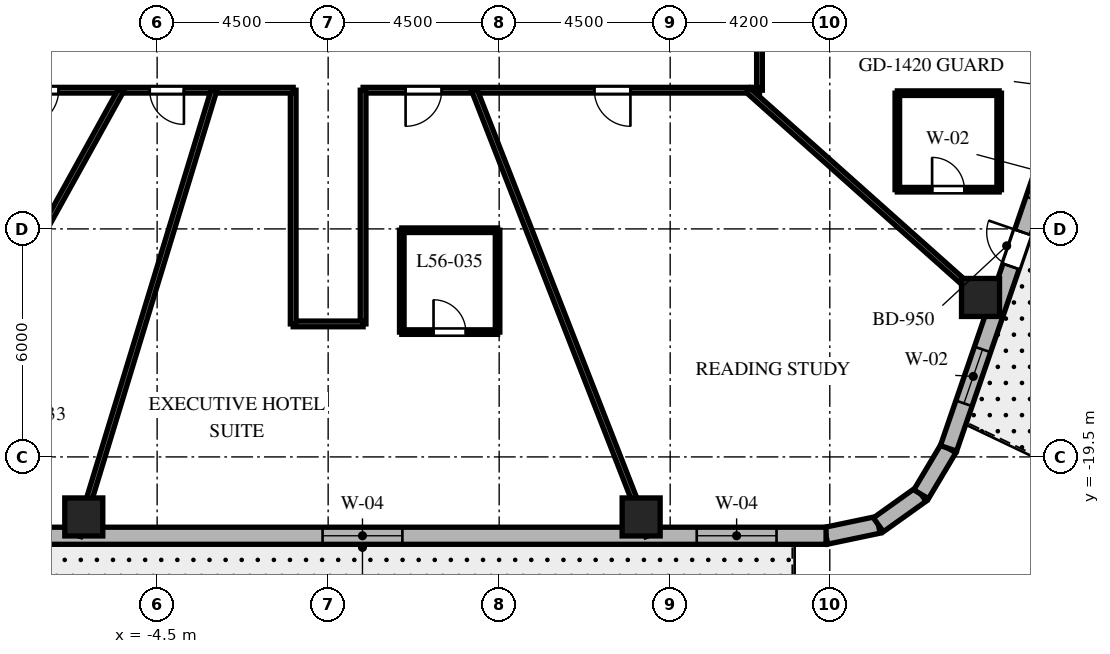
"""IFC4 building model, lengths in metres.
Left out: names, types, materials, properties, quantities, classifications, styles, units other than length and angle.
Written with IfcOpenShell. Run it as: python <this file> out.ifc"""

import sys

from ifc_helpers import new_model, si_unit, direction, frame, frame_2d, origin, origin_2d, place, context, subcontext, project, spatial, rectangle, extrude, element, fill, save


model = new_model("IFC4")
c1 = context("Model", 3, precision=1e-05, world=origin(), true_north=direction((0.0, 1.0)))
c2 = subcontext(c1, "Body", "Model", "MODEL_VIEW")
j1 = project(units=[si_unit("LENGTHUNIT", "METRE"), si_unit("PLANEANGLEUNIT", "RADIAN")], contexts=[c1])
p1 = place(None, origin())
s1 = spatial("IfcSite", under=j1, at=p1, CompositionType="ELEMENT")
p2 = place(p1, origin())
s2 = spatial("IfcBuilding", under=s1, at=p2, CompositionType="ELEMENT")
p3 = place(p2, frame((0.0, 0.0, 225.5)))
s3 = spatial("IfcBuildingStorey", under=s2, at=p3, CompositionType="ELEMENT", Elevation=225.5)
for number, where, z_axis, x_axis in (
    (1, (-6.43, -21.08, 0.0), (0.0, 0.0, 1.0), (1.0, 0.0, 0.0)),
    (2, (8.236, -21.08, 0.0), (0.0, 0.0, 1.0), (1.0, 0.0, 0.0)),
    (3, (17.166, -15.304, 0.0), (0.0, 0.0, 1.0), (1.0, 0.0, 0.0)),
):
    element("IfcColumn", number, at=place(p3, frame(where, z_axis=z_axis, x_axis=x_axis)), inside=s3, PredefinedType="COLUMN", context=c2, shape_type="SweptSolid", body=[
        extrude(rectangle(XDim=1.0, YDim=1.0, at=origin_2d()), origin(), (0.0, 0.0, 1.0), 3.8),
    ])
p4 = place(p3, frame((13.102, -21.575, 0.0), z_axis=(0.0, 0.0, 1.0), x_axis=(0.978757421505, 0.205021730188, 0.0)))
e4 = element("IfcWall", 4, at=p4, inside=s3, PredefinedType="SOLIDWALL", context=c2, shape_type="SweptSolid", body=[
    extrude(rectangle(XDim=1.406, YDim=0.45, at=frame_2d((0.703, 0.0))), origin(), (0.0, 0.0, 1.0), 3.5),
])
p5 = place(p3, frame((14.478, -21.287, 0.0), z_axis=(0.0, 0.0, 1.0), x_axis=(0.813888518617, 0.58102106611, 0.0)))
e5 = element("IfcWall", 5, at=p5, inside=s3, PredefinedType="SOLIDWALL", context=c2, shape_type="SweptSolid", body=[
    extrude(rectangle(XDim=1.383, YDim=0.45, at=frame_2d((0.691, 0.0))), origin(), (0.0, 0.0, 1.0), 3.5),
])
p6 = place(p3, frame((15.604, -20.483, 0.0), z_axis=(0.0, 0.0, 1.0), x_axis=(0.512222149036, 0.858852996756, 0.0)))
e6 = element("IfcWall", 6, at=p6, inside=s3, PredefinedType="SOLIDWALL", context=c2, shape_type="SweptSolid", body=[
    extrude(rectangle(XDim=1.406, YDim=0.45, at=frame_2d((0.703, 0.0))), origin(), (0.0, 0.0, 1.0), 3.5),
])
p7 = place(p3, frame((-11.298, -21.575, 0.0), z_axis=(0.0, 0.0, 1.0), x_axis=(1.0, 0.0, 0.0)))
e7 = element("IfcWall", 7, at=p7, inside=s3, PredefinedType="SOLIDWALL", context=c2, shape_type="SweptSolid", body=[
    extrude(rectangle(XDim=24.399, YDim=0.45, at=frame_2d((12.2, 0.0))), origin(), (0.0, 0.0, 1.0), 3.5),
])
p8 = place(p7, frame((2.55, 0.0, 0.0)))
e8 = element("IfcOpeningElement", 8, at=p8, cuts=e7, PredefinedType="OPENING", context=c2, shape_type="SweptSolid", body=[
    extrude(rectangle(XDim=1.0, YDim=2.15, at=frame_2d((0.5, 1.075))), frame((0.0, 0.235, 0.0), z_axis=(0.0, -1.0, 0.0), x_axis=(1.0, 0.0, 0.0)), (0.0, 0.0, 1.0), 0.47),
])
p9 = place(p7, frame((11.151, 0.0, 0.8)))
e9 = element("IfcOpeningElement", 9, at=p9, cuts=e7, PredefinedType="OPENING", context=c2, shape_type="SweptSolid", body=[
    extrude(rectangle(XDim=2.1, YDim=1.85, at=frame_2d((1.05, 0.925))), frame((0.0, 0.235, 0.0), z_axis=(0.0, -1.0, 0.0), x_axis=(1.0, 0.0, 0.0)), (0.0, 0.0, 1.0), 0.47),
])
p10 = place(p7, frame((20.996, 0.0, 0.8)))
e10 = element("IfcOpeningElement", 10, at=p10, cuts=e7, PredefinedType="OPENING", context=c2, shape_type="SweptSolid", body=[
    extrude(rectangle(XDim=2.1, YDim=1.85, at=frame_2d((1.05, 0.925))), frame((0.0, 0.235, 0.0), z_axis=(0.0, -1.0, 0.0), x_axis=(1.0, 0.0, 0.0)), (0.0, 0.0, 1.0), 0.47),
])
p11 = place(p3, frame((16.324, -19.275, 0.0), z_axis=(0.0, 0.0, 1.0), x_axis=(0.325083142304, 0.945685439557, 0.0)))
e11 = element("IfcWall", 11, at=p11, inside=s3, PredefinedType="SOLIDWALL", context=c2, shape_type="SweptSolid", body=[
    extrude(rectangle(XDim=20.224, YDim=0.45, at=frame_2d((10.112, 0.0))), origin(), (0.0, 0.0, 1.0), 3.5),
])
p12 = place(p11, frame((5.062, 0.0, 0.0)))
e12 = element("IfcOpeningElement", 12, at=p12, cuts=e11, PredefinedType="OPENING", context=c2, shape_type="SweptSolid", body=[
    extrude(rectangle(XDim=0.95, YDim=2.15, at=frame_2d((0.475, 1.075))), frame((0.0, 0.235, 0.0), z_axis=(0.0, -1.0, 0.0), x_axis=(1.0, 0.0, 0.0)), (0.0, 0.0, 1.0), 0.47),
])
p13 = place(p11, frame((1.253, 0.0, 0.8)))
e13 = element("IfcOpeningElement", 13, at=p13, cuts=e11, PredefinedType="OPENING", context=c2, shape_type="SweptSolid", body=[
    extrude(rectangle(XDim=1.5, YDim=1.8, at=frame_2d((0.75, 0.9))), frame((0.0, 0.235, 0.0), z_axis=(0.0, -1.0, 0.0), x_axis=(1.0, 0.0, 0.0)), (0.0, 0.0, 1.0), 0.47),
])
p14 = place(p11, frame((6.929, 0.0, 0.8)))
e14 = element("IfcOpeningElement", 14, at=p14, cuts=e11, PredefinedType="OPENING", context=c2, shape_type="SweptSolid", body=[
    extrude(rectangle(XDim=1.5, YDim=1.8, at=frame_2d((0.75, 0.9))), frame((0.0, 0.235, 0.0), z_axis=(0.0, -1.0, 0.0), x_axis=(1.0, 0.0, 0.0)), (0.0, 0.0, 1.0), 0.47),
])
p15 = place(p11, frame((12.612, 0.0, 0.8)))
e15 = element("IfcOpeningElement", 15, at=p15, cuts=e11, PredefinedType="OPENING", context=c2, shape_type="SweptSolid", body=[
    extrude(rectangle(XDim=1.5, YDim=1.8, at=frame_2d((0.75, 0.9))), frame((0.0, 0.235, 0.0), z_axis=(0.0, -1.0, 0.0), x_axis=(1.0, 0.0, 0.0)), (0.0, 0.0, 1.0), 0.47),
])
p16 = place(p11, frame((17.418, 0.0, 0.8)))
e16 = element("IfcOpeningElement", 16, at=p16, cuts=e11, PredefinedType="OPENING", context=c2, shape_type="SweptSolid", body=[
    extrude(rectangle(XDim=1.5, YDim=1.8, at=frame_2d((0.75, 0.9))), frame((0.0, 0.235, 0.0), z_axis=(0.0, -1.0, 0.0), x_axis=(1.0, 0.0, 0.0)), (0.0, 0.0, 1.0), 0.47),
])
p17 = place(p3, frame((11.35, -4.4, 0.0), z_axis=(0.0, 0.0, 1.0), x_axis=(0.0, -1.0, 0.0)))
e17 = element("IfcWall", 17, at=p17, inside=s3, PredefinedType="PARTITIONING", context=c2, shape_type="SweptSolid", body=[
    extrude(rectangle(XDim=5.45, YDim=0.15, at=frame_2d((2.725, 0.0))), origin(), (0.0, 0.0, 1.0), 2.99),
])
p18 = place(p17, frame((2.466, 0.0, 0.0)))
e18 = element("IfcOpeningElement", 18, at=p18, cuts=e17, PredefinedType="OPENING", context=c2, shape_type="SweptSolid", body=[
    extrude(rectangle(XDim=0.95, YDim=2.03, at=frame_2d((0.475, 1.015))), frame((0.0, 0.085, 0.0), z_axis=(0.0, -1.0, 0.0), x_axis=(1.0, 0.0, 0.0)), (0.0, 0.0, 1.0), 0.17),
])
p19 = place(p3, frame((11.35, -9.85, 0.0), z_axis=(0.0, 0.0, 1.0), x_axis=(-1.0, 0.0, 0.0)))
e19 = element("IfcWall", 19, at=p19, inside=s3, PredefinedType="PARTITIONING", context=c2, shape_type="SweptSolid", body=[
    extrude(rectangle(XDim=10.43, YDim=0.15, at=frame_2d((5.215, 0.0))), origin(), (0.0, 0.0, 1.0), 2.99),
])
p20 = place(p19, frame((8.362, 0.0, 0.0)))
e20 = element("IfcOpeningElement", 20, at=p20, cuts=e19, PredefinedType="OPENING", context=c2, shape_type="SweptSolid", body=[
    extrude(rectangle(XDim=0.95, YDim=2.03, at=frame_2d((0.475, 1.015))), frame((0.0, 0.085, 0.0), z_axis=(0.0, -1.0, 0.0), x_axis=(1.0, 0.0, 0.0)), (0.0, 0.0, 1.0), 0.17),
])
p21 = place(p19, frame((3.396, 0.0, 0.0)))
e21 = element("IfcOpeningElement", 21, at=p21, cuts=e19, PredefinedType="OPENING", context=c2, shape_type="SweptSolid", body=[
    extrude(rectangle(XDim=0.95, YDim=2.03, at=frame_2d((0.475, 1.015))), frame((0.0, 0.085, 0.0), z_axis=(0.0, -1.0, 0.0), x_axis=(1.0, 0.0, 0.0)), (0.0, 0.0, 1.0), 0.17),
])
p22 = place(p3, frame((0.92, -9.85, 0.0), z_axis=(0.0, 0.0, 1.0), x_axis=(0.0, -1.0, 0.0)))
e22 = element("IfcWall", 22, at=p22, inside=s3, PredefinedType="PARTITIONING", context=c2, shape_type="SweptSolid", body=[
    extrude(rectangle(XDim=6.15, YDim=0.15, at=frame_2d((3.075, 0.0))), origin(), (0.0, 0.0, 1.0), 3.027),
])
p23 = place(p3, frame((0.92, -16.0, 0.0), z_axis=(0.0, 0.0, 1.0), x_axis=(-1.0, 0.0, 0.0)))
e23 = element("IfcWall", 23, at=p23, inside=s3, PredefinedType="PARTITIONING", context=c2, shape_type="SweptSolid", body=[
    extrude(rectangle(XDim=1.84, YDim=0.15, at=frame_2d((0.92, 0.0))), origin(), (0.0, 0.0, 1.0), 3.5),
])
p24 = place(p3, frame((-0.92, -16.0, 0.0), z_axis=(0.0, 0.0, 1.0), x_axis=(0.0, 1.0, 0.0)))
e24 = element("IfcWall", 24, at=p24, inside=s3, PredefinedType="PARTITIONING", context=c2, shape_type="SweptSolid", body=[
    extrude(rectangle(XDim=6.15, YDim=0.15, at=frame_2d((3.075, 0.0))), origin(), (0.0, 0.0, 1.0), 3.027),
])
p25 = place(p3, frame((-0.92, -9.85, 0.0), z_axis=(0.0, 0.0, 1.0), x_axis=(-1.0, 0.0, 0.0)))
e25 = element("IfcWall", 25, at=p25, inside=s3, PredefinedType="PARTITIONING", context=c2, shape_type="SweptSolid", body=[
    extrude(rectangle(XDim=10.43, YDim=0.15, at=frame_2d((5.215, 0.0))), origin(), (0.0, 0.0, 1.0), 2.99),
])
p26 = place(p25, frame((6.172, 0.0, 0.0)))
e26 = element("IfcOpeningElement", 26, at=p26, cuts=e25, PredefinedType="OPENING", context=c2, shape_type="SweptSolid", body=[
    extrude(rectangle(XDim=0.95, YDim=2.03, at=frame_2d((0.475, 1.015))), frame((0.0, 0.085, 0.0), z_axis=(0.0, -1.0, 0.0), x_axis=(1.0, 0.0, 0.0)), (0.0, 0.0, 1.0), 0.17),
])
p27 = place(p25, frame((2.875, 0.0, 0.0)))
e27 = element("IfcOpeningElement", 27, at=p27, cuts=e25, PredefinedType="OPENING", context=c2, shape_type="SweptSolid", body=[
    extrude(rectangle(XDim=0.9, YDim=2.03, at=frame_2d((0.45, 1.015))), frame((0.0, 0.085, 0.0), z_axis=(0.0, -1.0, 0.0), x_axis=(1.0, 0.0, 0.0)), (0.0, 0.0, 1.0), 0.17),
])
p28 = place(p3, frame((-5.451, -9.85, 0.0), z_axis=(0.0, 0.0, 1.0), x_axis=(-0.484188830955, -0.87496352837, 0.0)))
e28 = element("IfcWall", 28, at=p28, inside=s3, PredefinedType="PARTITIONING", context=c2, shape_type="SweptSolid", body=[
    extrude(rectangle(XDim=13.107, YDim=0.15, at=frame_2d((6.553, 0.0))), origin(), (0.0, 0.0, 1.0), 2.74),
])
p29 = place(p3, frame((-3.004, -9.85, 0.0), z_axis=(0.0, 0.0, 1.0), x_axis=(-0.291775760688, -0.956486751333, 0.0)))
e29 = element("IfcWall", 29, at=p29, inside=s3, PredefinedType="PARTITIONING", context=c2, shape_type="SweptSolid", body=[
    extrude(rectangle(XDim=12.258, YDim=0.15, at=frame_2d((6.129, 0.0))), origin(), (0.0, 0.0, 1.0), 2.74),
])
p30 = place(p3, frame((3.848, -9.85, 0.0), z_axis=(0.0, 0.0, 1.0), x_axis=(0.363921778212, -0.931429513889, 0.0)))
e30 = element("IfcWall", 30, at=p30, inside=s3, PredefinedType="PARTITIONING", context=c2, shape_type="SweptSolid", body=[
    extrude(rectangle(XDim=12.588, YDim=0.15, at=frame_2d((6.294, 0.0))), origin(), (0.0, 0.0, 1.0), 2.74),
])
p31 = place(p3, frame((11.048, -9.85, 0.0), z_axis=(0.0, 0.0, 1.0), x_axis=(0.746444434655, -0.665447748492, 0.0)))
e31 = element("IfcWall", 31, at=p31, inside=s3, PredefinedType="PARTITIONING", context=c2, shape_type="SweptSolid", body=[
    extrude(rectangle(XDim=8.732, YDim=0.15, at=frame_2d((4.366, 0.0))), origin(), (0.0, 0.0, 1.0), 2.74),
])
p32 = place(p3, frame((11.35, -5.072, 0.0), z_axis=(0.0, 0.0, 1.0), x_axis=(0.912980177983, -0.408003914944, 0.0)))
e32 = element("IfcWall", 32, at=p32, inside=s3, PredefinedType="PARTITIONING", context=c2, shape_type="SweptSolid", body=[
    extrude(rectangle(XDim=9.358, YDim=0.15, at=frame_2d((4.679, 0.0))), origin(), (0.0, 0.0, 1.0), 2.74),
])
p33 = place(p3, frame((1.938, -16.215, 0.0), z_axis=(0.0, 0.0, 1.0), x_axis=(1.0, 0.0, 0.0)))
e33 = element("IfcWall", 33, at=p33, inside=s3, PredefinedType="PARTITIONING", context=c2, shape_type="SweptSolid", body=[
    extrude(rectangle(XDim=2.52, YDim=0.12, at=frame_2d((1.26, 0.0))), origin(), (0.0, 0.0, 1.0), 3.5),
])
p34 = place(p33, frame((0.835, 0.0, 0.0)))
e34 = element("IfcOpeningElement", 34, at=p34, cuts=e33, PredefinedType="OPENING", context=c2, shape_type="SweptSolid", body=[
    extrude(rectangle(XDim=0.85, YDim=2.03, at=frame_2d((0.425, 1.015))), frame((0.0, 0.07, 0.0), z_axis=(0.0, -1.0, 0.0), x_axis=(1.0, 0.0, 0.0)), (0.0, 0.0, 1.0), 0.14),
])
p35 = place(p3, frame((4.458, -16.215, 0.0), z_axis=(0.0, 0.0, 1.0), x_axis=(0.0, 1.0, 0.0)))
e35 = element("IfcWall", 35, at=p35, inside=s3, PredefinedType="PARTITIONING", context=c2, shape_type="SweptSolid", body=[
    extrude(rectangle(XDim=2.68, YDim=0.12, at=frame_2d((1.34, 0.0))), origin(), (0.0, 0.0, 1.0), 3.027),
])
p36 = place(p3, frame((4.458, -13.535, 0.0), z_axis=(0.0, 0.0, 1.0), x_axis=(-1.0, 0.0, 0.0)))
e36 = element("IfcWall", 36, at=p36, inside=s3, PredefinedType="PARTITIONING", context=c2, shape_type="SweptSolid", body=[
    extrude(rectangle(XDim=2.52, YDim=0.12, at=frame_2d((1.26, 0.0))), origin(), (0.0, 0.0, 1.0), 3.027),
])
p37 = place(p3, frame((1.938, -13.535, 0.0), z_axis=(0.0, 0.0, 1.0), x_axis=(0.0, -1.0, 0.0)))
e37 = element("IfcWall", 37, at=p37, inside=s3, PredefinedType="PARTITIONING", context=c2, shape_type="SweptSolid", body=[
    extrude(rectangle(XDim=2.68, YDim=0.12, at=frame_2d((1.34, 0.0))), origin(), (0.0, 0.0, 1.0), 3.027),
])
p38 = place(p3, frame((14.977, -12.468, 0.0), z_axis=(0.0, 0.0, 1.0), x_axis=(1.0, 0.0, 0.0)))
e38 = element("IfcWall", 38, at=p38, inside=s3, PredefinedType="PARTITIONING", context=c2, shape_type="SweptSolid", body=[
    extrude(rectangle(XDim=2.68, YDim=0.12, at=frame_2d((1.34, 0.0))), origin(), (0.0, 0.0, 1.0), 3.5),
])
p39 = place(p38, frame((0.915, 0.0, 0.0)))
e39 = element("IfcOpeningElement", 39, at=p39, cuts=e38, PredefinedType="OPENING", context=c2, shape_type="SweptSolid", body=[
    extrude(rectangle(XDim=0.85, YDim=2.03, at=frame_2d((0.425, 1.015))), frame((0.0, 0.07, 0.0), z_axis=(0.0, -1.0, 0.0), x_axis=(1.0, 0.0, 0.0)), (0.0, 0.0, 1.0), 0.14),
])
p40 = place(p3, frame((17.657, -12.468, 0.0), z_axis=(0.0, 0.0, 1.0), x_axis=(0.0, 1.0, 0.0)))
e40 = element("IfcWall", 40, at=p40, inside=s3, PredefinedType="PARTITIONING", context=c2, shape_type="SweptSolid", body=[
    extrude(rectangle(XDim=2.54, YDim=0.12, at=frame_2d((1.27, 0.0))), origin(), (0.0, 0.0, 1.0), 3.5),
])
p41 = place(p3, frame((17.657, -9.928, 0.0), z_axis=(0.0, 0.0, 1.0), x_axis=(-1.0, 0.0, 0.0)))
e41 = element("IfcWall", 41, at=p41, inside=s3, PredefinedType="PARTITIONING", context=c2, shape_type="SweptSolid", body=[
    extrude(rectangle(XDim=2.68, YDim=0.12, at=frame_2d((1.34, 0.0))), origin(), (0.0, 0.0, 1.0), 3.073),
])
p42 = place(p3, frame((14.977, -9.928, 0.0), z_axis=(0.0, 0.0, 1.0), x_axis=(0.0, -1.0, 0.0)))
e42 = element("IfcWall", 42, at=p42, inside=s3, PredefinedType="PARTITIONING", context=c2, shape_type="SweptSolid", body=[
    extrude(rectangle(XDim=2.54, YDim=0.12, at=frame_2d((1.27, 0.0))), origin(), (0.0, 0.0, 1.0), 3.073),
])
p43 = place(p9, origin())
e43 = element("IfcWindow", 43, at=p43, inside=s3, PartitioningType="SINGLE_PANEL", PredefinedType="WINDOW", context=c2, shape_type="SweptSolid", body=[
    extrude(rectangle(XDim=2.1, YDim=1.85, at=frame_2d((1.05, 0.925))), frame((0.0, 0.03, 0.0), z_axis=(0.0, -1.0, 0.0), x_axis=(1.0, 0.0, 0.0)), (0.0, 0.0, 1.0), 0.06),
])
fill(e9, e43)
p44 = place(p10, origin())
e44 = element("IfcWindow", 44, at=p44, inside=s3, PartitioningType="SINGLE_PANEL", PredefinedType="WINDOW", context=c2, shape_type="SweptSolid", body=[
    extrude(rectangle(XDim=2.1, YDim=1.85, at=frame_2d((1.05, 0.925))), frame((0.0, 0.03, 0.0), z_axis=(0.0, -1.0, 0.0), x_axis=(1.0, 0.0, 0.0)), (0.0, 0.0, 1.0), 0.06),
])
fill(e10, e44)
p45 = place(p12, origin())
e45 = element("IfcDoor", 45, at=p45, inside=s3, OperationType="SINGLE_SWING_RIGHT", PredefinedType="DOOR", context=c2, shape_type="SweptSolid", body=[
    extrude(rectangle(XDim=0.95, YDim=2.15, at=frame_2d((0.475, 1.075))), frame((0.0, 0.025, 0.0), z_axis=(0.0, -1.0, 0.0), x_axis=(1.0, 0.0, 0.0)), (0.0, 0.0, 1.0), 0.05),
])
fill(e12, e45)
p46 = place(p13, origin())
e46 = element("IfcWindow", 46, at=p46, inside=s3, PartitioningType="SINGLE_PANEL", PredefinedType="WINDOW", context=c2, shape_type="SweptSolid", body=[
    extrude(rectangle(XDim=1.5, YDim=1.8, at=frame_2d((0.75, 0.9))), frame((0.0, 0.03, 0.0), z_axis=(0.0, -1.0, 0.0), x_axis=(1.0, 0.0, 0.0)), (0.0, 0.0, 1.0), 0.06),
])
fill(e13, e46)
p47 = place(p26, origin())
e47 = element("IfcDoor", 47, at=p47, inside=s3, OperationType="SINGLE_SWING_RIGHT", PredefinedType="DOOR", context=c2, shape_type="SweptSolid", body=[
    extrude(rectangle(XDim=0.95, YDim=2.03, at=frame_2d((0.475, 1.015))), frame((0.0, 0.025, 0.0), z_axis=(0.0, -1.0, 0.0), x_axis=(1.0, 0.0, 0.0)), (0.0, 0.0, 1.0), 0.05),
])
fill(e26, e47)
p48 = place(p27, origin())
e48 = element("IfcDoor", 48, at=p48, inside=s3, OperationType="SINGLE_SWING_LEFT", PredefinedType="DOOR", context=c2, shape_type="SweptSolid", body=[
    extrude(rectangle(XDim=0.9, YDim=2.03, at=frame_2d((0.45, 1.015))), frame((0.0, 0.025, 0.0), z_axis=(0.0, -1.0, 0.0), x_axis=(1.0, 0.0, 0.0)), (0.0, 0.0, 1.0), 0.05),
])
fill(e27, e48)
p49 = place(p20, origin())
e49 = element("IfcDoor", 49, at=p49, inside=s3, OperationType="SINGLE_SWING_RIGHT", PredefinedType="DOOR", context=c2, shape_type="SweptSolid", body=[
    extrude(rectangle(XDim=0.95, YDim=2.03, at=frame_2d((0.475, 1.015))), frame((0.0, 0.025, 0.0), z_axis=(0.0, -1.0, 0.0), x_axis=(1.0, 0.0, 0.0)), (0.0, 0.0, 1.0), 0.05),
])
fill(e20, e49)
p50 = place(p34, origin())
e50 = element("IfcDoor", 50, at=p50, inside=s3, OperationType="SINGLE_SWING_LEFT", PredefinedType="DOOR", context=c2, shape_type="SweptSolid", body=[
    extrude(rectangle(XDim=0.85, YDim=2.03, at=frame_2d((0.425, 1.015))), frame((0.0, 0.025, 0.0), z_axis=(0.0, -1.0, 0.0), x_axis=(1.0, 0.0, 0.0)), (0.0, 0.0, 1.0), 0.05),
])
fill(e34, e50)
p51 = place(p21, origin())
e51 = element("IfcDoor", 51, at=p51, inside=s3, OperationType="SINGLE_SWING_LEFT", PredefinedType="DOOR", context=c2, shape_type="SweptSolid", body=[
    extrude(rectangle(XDim=0.95, YDim=2.03, at=frame_2d((0.475, 1.015))), frame((0.0, 0.025, 0.0), z_axis=(0.0, -1.0, 0.0), x_axis=(1.0, 0.0, 0.0)), (0.0, 0.0, 1.0), 0.05),
])
fill(e21, e51)
p52 = place(p39, origin())
e52 = element("IfcDoor", 52, at=p52, inside=s3, OperationType="SINGLE_SWING_LEFT", PredefinedType="DOOR", context=c2, shape_type="SweptSolid", body=[
    extrude(rectangle(XDim=0.85, YDim=2.03, at=frame_2d((0.425, 1.015))), frame((0.0, 0.025, 0.0), z_axis=(0.0, -1.0, 0.0), x_axis=(1.0, 0.0, 0.0)), (0.0, 0.0, 1.0), 0.05),
])
fill(e39, e52)
save(model, sys.argv[1])
